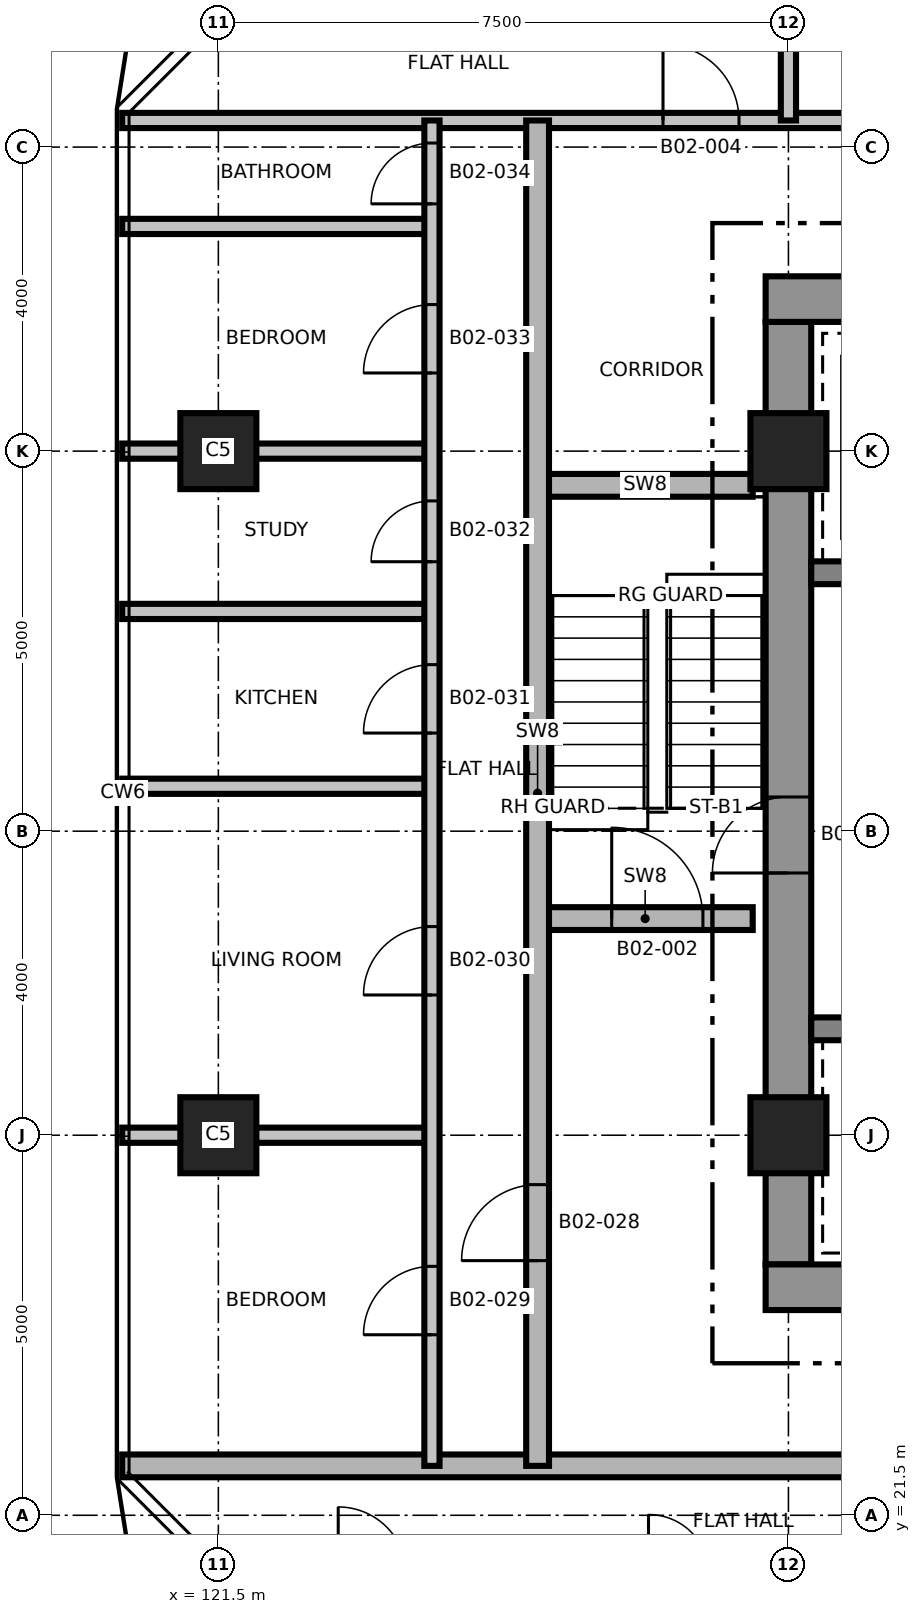
"""IFC4 building model, lengths in metres.
Left out: names, types, materials, properties, quantities, classifications, styles, units other than length and angle.
Written with IfcOpenShell. Run it as: python <this file> out.ifc"""

import sys

from ifc_helpers import new_model, si_unit, direction, frame, frame_2d, origin, origin_2d, place, context, subcontext, project, spatial, rectangle, extrude, element, fill, save


model = new_model("IFC4")
c1 = context("Model", 3, precision=1e-05, world=origin(), true_north=direction((0.0, 1.0)))
c2 = subcontext(c1, "Body", "Model", "MODEL_VIEW")
j1 = project(units=[si_unit("LENGTHUNIT", "METRE"), si_unit("PLANEANGLEUNIT", "RADIAN")], contexts=[c1])
p1 = place(None, origin())
s1 = spatial("IfcSite", under=j1, at=p1, CompositionType="ELEMENT")
p2 = place(p1, origin())
s2 = spatial("IfcBuilding", under=s1, at=p2, CompositionType="ELEMENT")
p3 = place(p2, frame((0.0, 0.0, 44.6)))
s3 = spatial("IfcBuildingStorey", under=s2, at=p3, CompositionType="ELEMENT", Elevation=44.6)
p4 = place(p3, frame((129.0, 24.8, 0.0), z_axis=(0.0, 0.0, 1.0), x_axis=(0.0, 1.0, 0.0)))
e1 = element("IfcWall", 1, at=p4, inside=s3, PredefinedType="SHEAR", context=c2, shape_type="SweptSolid", body=[
    extrude(rectangle(XDim=12.4, YDim=0.6, at=frame_2d((6.2, 0.0))), origin(), (0.0, 0.0, 1.0), 3.7),
])
p5 = place(p4, frame((5.15, 0.0, 0.0)))
e2 = element("IfcOpeningElement", 2, at=p5, cuts=e1, PredefinedType="OPENING", context=c2, shape_type="SweptSolid", body=[
    extrude(rectangle(XDim=1.0, YDim=2.1, at=frame_2d((0.5, 1.05))), frame((0.0, 0.31, 0.0), z_axis=(0.0, -1.0, 0.0), x_axis=(1.0, 0.0, 0.0)), (0.0, 0.0, 1.0), 0.62),
])
p6 = place(p3, frame((128.7, 24.5, 0.0), z_axis=(0.0, 0.0, 1.0), x_axis=(1.0, 0.0, 0.0)))
e3 = element("IfcWall", 3, at=p6, inside=s3, PredefinedType="SHEAR", context=c2, shape_type="SweptSolid", body=[
    extrude(rectangle(XDim=15.0, YDim=0.6, at=frame_2d((7.5, 0.0))), origin(), (0.0, 0.0, 1.0), 3.7),
])
p7 = place(p6, frame((9.65, 0.0, 0.0)))
e4 = element("IfcOpeningElement", 4, at=p7, cuts=e3, PredefinedType="OPENING", context=c2, shape_type="SweptSolid", body=[
    extrude(rectangle(XDim=1.5, YDim=2.1, at=frame_2d((0.75, 1.05))), frame((0.0, 0.31, 0.0), z_axis=(0.0, -1.0, 0.0), x_axis=(1.0, 0.0, 0.0)), (0.0, 0.0, 1.0), 0.62),
])
p8 = place(p6, frame((1.25, 0.0, 0.0)))
e5 = element("IfcOpeningElement", 5, at=p8, cuts=e3, PredefinedType="OPENING", context=c2, shape_type="SweptSolid", body=[
    extrude(rectangle(XDim=0.9, YDim=2.1, at=frame_2d((0.45, 1.05))), frame((0.0, 0.31, 0.0), z_axis=(0.0, -1.0, 0.0), x_axis=(1.0, 0.0, 0.0)), (0.0, 0.0, 1.0), 0.62),
])
p9 = place(p3, frame((128.7, 37.5, 0.0), z_axis=(0.0, 0.0, 1.0), x_axis=(1.0, 0.0, 0.0)))
e6 = element("IfcWall", 6, at=p9, inside=s3, PredefinedType="SHEAR", context=c2, shape_type="SweptSolid", body=[
    extrude(rectangle(XDim=15.0, YDim=0.6, at=frame_2d((7.5, 0.0))), origin(), (0.0, 0.0, 1.0), 3.7),
])
p10 = place(p9, frame((9.65, 0.0, 0.0)))
e7 = element("IfcOpeningElement", 7, at=p10, cuts=e6, PredefinedType="OPENING", context=c2, shape_type="SweptSolid", body=[
    extrude(rectangle(XDim=1.5, YDim=2.1, at=frame_2d((0.75, 1.05))), frame((0.0, 0.31, 0.0), z_axis=(0.0, -1.0, 0.0), x_axis=(1.0, 0.0, 0.0)), (0.0, 0.0, 1.0), 0.62),
])
p11 = place(p9, frame((12.85, 0.0, 0.0)))
e8 = element("IfcOpeningElement", 8, at=p11, cuts=e6, PredefinedType="OPENING", context=c2, shape_type="SweptSolid", body=[
    extrude(rectangle(XDim=0.9, YDim=2.1, at=frame_2d((0.45, 1.05))), frame((0.0, 0.31, 0.0), z_axis=(0.0, -1.0, 0.0), x_axis=(1.0, 0.0, 0.0)), (0.0, 0.0, 1.0), 0.62),
])
p12 = place(p9, frame((5.55, 0.0, 0.0)))
e9 = element("IfcOpeningElement", 9, at=p12, cuts=e6, PredefinedType="OPENING", context=c2, shape_type="SweptSolid", body=[
    extrude(rectangle(XDim=0.9, YDim=2.1, at=frame_2d((0.45, 1.05))), frame((0.0, 0.31, 0.0), z_axis=(0.0, -1.0, 0.0), x_axis=(1.0, 0.0, 0.0)), (0.0, 0.0, 1.0), 0.62),
])
p13 = place(p3, frame((129.3, 27.9, 0.0), z_axis=(0.0, 0.0, 1.0), x_axis=(1.0, 0.0, 0.0)))
e10 = element("IfcWall", 10, at=p13, inside=s3, PredefinedType="SHEAR", context=c2, shape_type="SweptSolid", body=[
    extrude(rectangle(XDim=2.65, YDim=0.3, at=frame_2d((1.325, 0.0))), origin(), (0.0, 0.0, 1.0), 3.7),
])
p14 = place(p3, frame((129.3, 33.9, 0.0), z_axis=(0.0, 0.0, 1.0), x_axis=(1.0, 0.0, 0.0)))
e11 = element("IfcWall", 11, at=p14, inside=s3, PredefinedType="SHEAR", context=c2, shape_type="SweptSolid", body=[
    extrude(rectangle(XDim=2.65, YDim=0.3, at=frame_2d((1.325, 0.0))), origin(), (0.0, 0.0, 1.0), 3.7),
])
p15 = place(p14, frame((1.05, 0.0, 0.0)))
e12 = element("IfcOpeningElement", 12, at=p15, cuts=e11, PredefinedType="OPENING", context=c2, shape_type="SweptSolid", body=[
    extrude(rectangle(XDim=1.3, YDim=2.4, at=frame_2d((0.65, 1.2))), frame((0.0, 0.16, 0.0), z_axis=(0.0, -1.0, 0.0), x_axis=(1.0, 0.0, 0.0)), (0.0, 0.0, 1.0), 0.32),
])
for number, where, z_axis, x_axis in (
    (13, (121.5, 26.5, 0.0), (0.0, 0.0, 1.0), (1.0, 0.0, 0.0)),
    (14, (129.0, 26.5, 0.0), (0.0, 0.0, 1.0), (1.0, 0.0, 0.0)),
    (15, (121.5, 35.5, 0.0), (0.0, 0.0, 1.0), (1.0, 0.0, 0.0)),
    (16, (129.0, 35.5, 0.0), (0.0, 0.0, 1.0), (1.0, 0.0, 0.0)),
):
    element("IfcColumn", number, at=place(p3, frame(where, z_axis=z_axis, x_axis=x_axis)), inside=s3, PredefinedType="COLUMN", context=c2, shape_type="SweptSolid", body=[
        extrude(rectangle(XDim=1.0, YDim=1.0, at=origin_2d()), origin(), (0.0, 0.0, 1.0), 3.7),
    ])
p16 = place(p3, frame((120.235, 22.15, 0.0), z_axis=(0.0, 0.0, 1.0), x_axis=(1.0, 0.0, 0.0)))
e17 = element("IfcWall", 17, at=p16, inside=s3, PredefinedType="SHEAR", context=c2, shape_type="SweptSolid", body=[
    extrude(rectangle(XDim=32.53, YDim=0.3, at=frame_2d((16.265, 0.0))), origin(), (0.0, 0.0, 1.0), 3.4),
])
p17 = place(p16, frame((22.515, 0.0, 0.0)))
e18 = element("IfcOpeningElement", 18, at=p17, cuts=e17, PredefinedType="OPENING", context=c2, shape_type="SweptSolid", body=[
    extrude(rectangle(XDim=1.0, YDim=2.1, at=frame_2d((0.5, 1.05))), frame((0.0, 0.16, 0.0), z_axis=(0.0, -1.0, 0.0), x_axis=(1.0, 0.0, 0.0)), (0.0, 0.0, 1.0), 0.32),
])
p18 = place(p16, frame((10.865, 0.0, 0.0)))
e19 = element("IfcOpeningElement", 19, at=p18, cuts=e17, PredefinedType="OPENING", context=c2, shape_type="SweptSolid", body=[
    extrude(rectangle(XDim=1.0, YDim=2.1, at=frame_2d((0.5, 1.05))), frame((0.0, 0.16, 0.0), z_axis=(0.0, -1.0, 0.0), x_axis=(1.0, 0.0, 0.0)), (0.0, 0.0, 1.0), 0.32),
])
p19 = place(p16, frame((24.415, 0.0, 0.0)))
e20 = element("IfcOpeningElement", 20, at=p19, cuts=e17, PredefinedType="OPENING", context=c2, shape_type="SweptSolid", body=[
    extrude(rectangle(XDim=1.0, YDim=2.1, at=frame_2d((0.5, 1.05))), frame((0.0, 0.16, 0.0), z_axis=(0.0, -1.0, 0.0), x_axis=(1.0, 0.0, 0.0)), (0.0, 0.0, 1.0), 0.32),
])
p20 = place(p16, frame((16.515, 0.0, 0.0)))
e21 = element("IfcOpeningElement", 21, at=p20, cuts=e17, PredefinedType="OPENING", context=c2, shape_type="SweptSolid", body=[
    extrude(rectangle(XDim=0.9, YDim=2.1, at=frame_2d((0.45, 1.05))), frame((0.0, 0.16, 0.0), z_axis=(0.0, -1.0, 0.0), x_axis=(1.0, 0.0, 0.0)), (0.0, 0.0, 1.0), 0.32),
])
p21 = place(p3, frame((120.235, 26.5, 0.0), z_axis=(0.0, 0.0, 1.0), x_axis=(1.0, 0.0, 0.0)))
e22 = element("IfcWall", 22, at=p21, inside=s3, PredefinedType="PARTITIONING", context=c2, shape_type="SweptSolid", body=[
    extrude(rectangle(XDim=4.075, YDim=0.2, at=frame_2d((2.038, 0.0))), origin(), (0.0, 0.0, 1.0), 3.4),
])
p22 = place(p3, frame((125.7, 29.35, 0.0), z_axis=(0.0, 0.0, 1.0), x_axis=(1.0, 0.0, 0.0)))
e23 = element("IfcWall", 23, at=p22, inside=s3, PredefinedType="SHEAR", context=c2, shape_type="SweptSolid", body=[
    extrude(rectangle(XDim=2.83, YDim=0.3, at=frame_2d((1.415, 0.0))), origin(), (0.0, 0.0, 1.0), 3.4),
])
p23 = place(p22, frame((0.975, 0.0, 0.0)))
e24 = element("IfcOpeningElement", 24, at=p23, cuts=e23, PredefinedType="OPENING", context=c2, shape_type="SweptSolid", body=[
    extrude(rectangle(XDim=1.2, YDim=2.1, at=frame_2d((0.6, 1.05))), frame((0.0, 0.16, 0.0), z_axis=(0.0, -1.0, 0.0), x_axis=(1.0, 0.0, 0.0)), (0.0, 0.0, 1.0), 0.32),
])
for number, where, z_axis, x_axis in (
    (25, (120.235, 31.091, 0.0), (0.0, 0.0, 1.0), (1.0, 0.0, 0.0)),
    (26, (120.235, 33.391, 0.0), (0.0, 0.0, 1.0), (1.0, 0.0, 0.0)),
):
    element("IfcWall", number, at=place(p3, frame(where, z_axis=z_axis, x_axis=x_axis)), inside=s3, PredefinedType="PARTITIONING", context=c2, shape_type="SweptSolid", body=[
        extrude(rectangle(XDim=4.075, YDim=0.2, at=frame_2d((2.038, 0.0))), origin(), (0.0, 0.0, 1.0), 3.4),
    ])
p24 = place(p3, frame((125.7, 35.05, 0.0), z_axis=(0.0, 0.0, 1.0), x_axis=(1.0, 0.0, 0.0)))
e27 = element("IfcWall", 27, at=p24, inside=s3, PredefinedType="SHEAR", context=c2, shape_type="SweptSolid", body=[
    extrude(rectangle(XDim=2.83, YDim=0.3, at=frame_2d((1.415, 0.0))), origin(), (0.0, 0.0, 1.0), 3.4),
])
for number, where, z_axis, x_axis in (
    (28, (120.235, 35.5, 0.0), (0.0, 0.0, 1.0), (1.0, 0.0, 0.0)),
    (29, (120.235, 38.456, 0.0), (0.0, 0.0, 1.0), (1.0, 0.0, 0.0)),
):
    element("IfcWall", number, at=place(p3, frame(where, z_axis=z_axis, x_axis=x_axis)), inside=s3, PredefinedType="PARTITIONING", context=c2, shape_type="SweptSolid", body=[
        extrude(rectangle(XDim=4.075, YDim=0.2, at=frame_2d((2.038, 0.0))), origin(), (0.0, 0.0, 1.0), 3.4),
    ])
p25 = place(p3, frame((120.235, 39.85, 0.0), z_axis=(0.0, 0.0, 1.0), x_axis=(1.0, 0.0, 0.0)))
e30 = element("IfcWall", 30, at=p25, inside=s3, PredefinedType="PARTITIONING", context=c2, shape_type="SweptSolid", body=[
    extrude(rectangle(XDim=32.53, YDim=0.2, at=frame_2d((16.265, 0.0))), origin(), (0.0, 0.0, 1.0), 3.4),
])
p26 = place(p25, frame((7.115, 0.0, 0.0)))
e31 = element("IfcOpeningElement", 31, at=p26, cuts=e30, PredefinedType="OPENING", context=c2, shape_type="SweptSolid", body=[
    extrude(rectangle(XDim=1.0, YDim=2.1, at=frame_2d((0.5, 1.05))), frame((0.0, 0.11, 0.0), z_axis=(0.0, -1.0, 0.0), x_axis=(1.0, 0.0, 0.0)), (0.0, 0.0, 1.0), 0.22),
])
p27 = place(p25, frame((15.765, 0.0, 0.0)))
e32 = element("IfcOpeningElement", 32, at=p27, cuts=e30, PredefinedType="OPENING", context=c2, shape_type="SweptSolid", body=[
    extrude(rectangle(XDim=1.0, YDim=2.1, at=frame_2d((0.5, 1.05))), frame((0.0, 0.11, 0.0), z_axis=(0.0, -1.0, 0.0), x_axis=(1.0, 0.0, 0.0)), (0.0, 0.0, 1.0), 0.22),
])
p28 = place(p25, frame((24.415, 0.0, 0.0)))
e33 = element("IfcOpeningElement", 33, at=p28, cuts=e30, PredefinedType="OPENING", context=c2, shape_type="SweptSolid", body=[
    extrude(rectangle(XDim=1.0, YDim=2.1, at=frame_2d((0.5, 1.05))), frame((0.0, 0.11, 0.0), z_axis=(0.0, -1.0, 0.0), x_axis=(1.0, 0.0, 0.0)), (0.0, 0.0, 1.0), 0.22),
])
p29 = place(p3, frame((124.31, 22.15, 0.0), z_axis=(0.0, 0.0, 1.0), x_axis=(0.0, 1.0, 0.0)))
e34 = element("IfcWall", 34, at=p29, inside=s3, PredefinedType="PARTITIONING", context=c2, shape_type="SweptSolid", body=[
    extrude(rectangle(XDim=17.7, YDim=0.2, at=frame_2d((8.85, 0.0))), origin(), (0.0, 0.0, 1.0), 3.4),
])
p30 = place(p29, frame((1.725, 0.0, 0.0)))
e35 = element("IfcOpeningElement", 35, at=p30, cuts=e34, PredefinedType="OPENING", context=c2, shape_type="SweptSolid", body=[
    extrude(rectangle(XDim=0.9, YDim=2.1, at=frame_2d((0.45, 1.05))), frame((0.0, 0.11, 0.0), z_axis=(0.0, -1.0, 0.0), x_axis=(1.0, 0.0, 0.0)), (0.0, 0.0, 1.0), 0.22),
])
p31 = place(p29, frame((6.195, 0.0, 0.0)))
e36 = element("IfcOpeningElement", 36, at=p31, cuts=e34, PredefinedType="OPENING", context=c2, shape_type="SweptSolid", body=[
    extrude(rectangle(XDim=0.9, YDim=2.1, at=frame_2d((0.45, 1.05))), frame((0.0, 0.11, 0.0), z_axis=(0.0, -1.0, 0.0), x_axis=(1.0, 0.0, 0.0)), (0.0, 0.0, 1.0), 0.22),
])
p32 = place(p29, frame((9.641, 0.0, 0.0)))
e37 = element("IfcOpeningElement", 37, at=p32, cuts=e34, PredefinedType="OPENING", context=c2, shape_type="SweptSolid", body=[
    extrude(rectangle(XDim=0.9, YDim=2.1, at=frame_2d((0.45, 1.05))), frame((0.0, 0.11, 0.0), z_axis=(0.0, -1.0, 0.0), x_axis=(1.0, 0.0, 0.0)), (0.0, 0.0, 1.0), 0.22),
])
p33 = place(p29, frame((11.895, 0.0, 0.0)))
e38 = element("IfcOpeningElement", 38, at=p33, cuts=e34, PredefinedType="OPENING", context=c2, shape_type="SweptSolid", body=[
    extrude(rectangle(XDim=0.8, YDim=2.1, at=frame_2d((0.4, 1.05))), frame((0.0, 0.11, 0.0), z_axis=(0.0, -1.0, 0.0), x_axis=(1.0, 0.0, 0.0)), (0.0, 0.0, 1.0), 0.22),
])
p34 = place(p29, frame((14.378, 0.0, 0.0)))
e39 = element("IfcOpeningElement", 39, at=p34, cuts=e34, PredefinedType="OPENING", context=c2, shape_type="SweptSolid", body=[
    extrude(rectangle(XDim=0.9, YDim=2.1, at=frame_2d((0.45, 1.05))), frame((0.0, 0.11, 0.0), z_axis=(0.0, -1.0, 0.0), x_axis=(1.0, 0.0, 0.0)), (0.0, 0.0, 1.0), 0.22),
])
p35 = place(p29, frame((16.603, 0.0, 0.0)))
e40 = element("IfcOpeningElement", 40, at=p35, cuts=e34, PredefinedType="OPENING", context=c2, shape_type="SweptSolid", body=[
    extrude(rectangle(XDim=0.8, YDim=2.1, at=frame_2d((0.4, 1.05))), frame((0.0, 0.11, 0.0), z_axis=(0.0, -1.0, 0.0), x_axis=(1.0, 0.0, 0.0)), (0.0, 0.0, 1.0), 0.22),
])
p36 = place(p3, frame((125.7, 22.15, 0.0), z_axis=(0.0, 0.0, 1.0), x_axis=(0.0, 1.0, 0.0)))
e41 = element("IfcWall", 41, at=p36, inside=s3, PredefinedType="SHEAR", context=c2, shape_type="SweptSolid", body=[
    extrude(rectangle(XDim=17.7, YDim=0.3, at=frame_2d((8.85, 0.0))), origin(), (0.0, 0.0, 1.0), 3.4),
])
p37 = place(p36, frame((2.7, 0.0, 0.0)))
e42 = element("IfcOpeningElement", 42, at=p37, cuts=e41, PredefinedType="OPENING", context=c2, shape_type="SweptSolid", body=[
    extrude(rectangle(XDim=1.0, YDim=2.1, at=frame_2d((0.5, 1.05))), frame((0.0, 0.16, 0.0), z_axis=(0.0, -1.0, 0.0), x_axis=(1.0, 0.0, 0.0)), (0.0, 0.0, 1.0), 0.32),
])
p38 = place(p3, frame((129.0, 39.85, 0.0), z_axis=(0.0, 0.0, 1.0), x_axis=(0.0, 1.0, 0.0)))
e43 = element("IfcWall", 43, at=p38, inside=s3, PredefinedType="PARTITIONING", context=c2, shape_type="SweptSolid", body=[
    extrude(rectangle(XDim=5.915, YDim=0.2, at=frame_2d((2.958, 0.0))), origin(), (0.0, 0.0, 1.0), 3.4),
])
p39 = place(p23, origin())
e44 = element("IfcDoor", 44, at=p39, inside=s3, OperationType="SINGLE_SWING_RIGHT", PredefinedType="DOOR", context=c2, shape_type="SweptSolid", body=[
    extrude(rectangle(XDim=1.2, YDim=2.1, at=frame_2d((0.6, 1.05))), frame((0.0, 0.025, 0.0), z_axis=(0.0, -1.0, 0.0), x_axis=(1.0, 0.0, 0.0)), (0.0, 0.0, 1.0), 0.05),
])
fill(e24, e44)
p40 = place(p26, origin())
e45 = element("IfcDoor", 45, at=p40, inside=s3, OperationType="SINGLE_SWING_RIGHT", PredefinedType="DOOR", context=c2, shape_type="SweptSolid", body=[
    extrude(rectangle(XDim=1.0, YDim=2.1, at=frame_2d((0.5, 1.05))), frame((0.0, 0.025, 0.0), z_axis=(0.0, -1.0, 0.0), x_axis=(1.0, 0.0, 0.0)), (0.0, 0.0, 1.0), 0.05),
])
fill(e31, e45)
p41 = place(p37, origin())
e46 = element("IfcDoor", 46, at=p41, inside=s3, OperationType="SINGLE_SWING_RIGHT", PredefinedType="DOOR", context=c2, shape_type="SweptSolid", body=[
    extrude(rectangle(XDim=1.0, YDim=2.1, at=frame_2d((0.5, 1.05))), frame((0.0, 0.025, 0.0), z_axis=(0.0, -1.0, 0.0), x_axis=(1.0, 0.0, 0.0)), (0.0, 0.0, 1.0), 0.05),
])
fill(e42, e46)
p42 = place(p30, origin())
e47 = element("IfcDoor", 47, at=p42, inside=s3, OperationType="SINGLE_SWING_LEFT", PredefinedType="DOOR", context=c2, shape_type="SweptSolid", body=[
    extrude(rectangle(XDim=0.9, YDim=2.1, at=frame_2d((0.45, 1.05))), frame((0.0, 0.025, 0.0), z_axis=(0.0, -1.0, 0.0), x_axis=(1.0, 0.0, 0.0)), (0.0, 0.0, 1.0), 0.05),
])
fill(e35, e47)
p43 = place(p31, origin())
e48 = element("IfcDoor", 48, at=p43, inside=s3, OperationType="SINGLE_SWING_RIGHT", PredefinedType="DOOR", context=c2, shape_type="SweptSolid", body=[
    extrude(rectangle(XDim=0.9, YDim=2.1, at=frame_2d((0.45, 1.05))), frame((0.0, 0.025, 0.0), z_axis=(0.0, -1.0, 0.0), x_axis=(1.0, 0.0, 0.0)), (0.0, 0.0, 1.0), 0.05),
])
fill(e36, e48)
p44 = place(p32, origin())
e49 = element("IfcDoor", 49, at=p44, inside=s3, OperationType="SINGLE_SWING_LEFT", PredefinedType="DOOR", context=c2, shape_type="SweptSolid", body=[
    extrude(rectangle(XDim=0.9, YDim=2.1, at=frame_2d((0.45, 1.05))), frame((0.0, 0.025, 0.0), z_axis=(0.0, -1.0, 0.0), x_axis=(1.0, 0.0, 0.0)), (0.0, 0.0, 1.0), 0.05),
])
fill(e37, e49)
p45 = place(p33, origin())
e50 = element("IfcDoor", 50, at=p45, inside=s3, OperationType="SINGLE_SWING_RIGHT", PredefinedType="DOOR", context=c2, shape_type="SweptSolid", body=[
    extrude(rectangle(XDim=0.8, YDim=2.1, at=frame_2d((0.4, 1.05))), frame((0.0, 0.025, 0.0), z_axis=(0.0, -1.0, 0.0), x_axis=(1.0, 0.0, 0.0)), (0.0, 0.0, 1.0), 0.05),
])
fill(e38, e50)
p46 = place(p34, origin())
e51 = element("IfcDoor", 51, at=p46, inside=s3, OperationType="SINGLE_SWING_LEFT", PredefinedType="DOOR", context=c2, shape_type="SweptSolid", body=[
    extrude(rectangle(XDim=0.9, YDim=2.1, at=frame_2d((0.45, 1.05))), frame((0.0, 0.025, 0.0), z_axis=(0.0, -1.0, 0.0), x_axis=(1.0, 0.0, 0.0)), (0.0, 0.0, 1.0), 0.05),
])
fill(e39, e51)
p47 = place(p35, origin())
e52 = element("IfcDoor", 52, at=p47, inside=s3, OperationType="SINGLE_SWING_RIGHT", PredefinedType="DOOR", context=c2, shape_type="SweptSolid", body=[
    extrude(rectangle(XDim=0.8, YDim=2.1, at=frame_2d((0.4, 1.05))), frame((0.0, 0.025, 0.0), z_axis=(0.0, -1.0, 0.0), x_axis=(1.0, 0.0, 0.0)), (0.0, 0.0, 1.0), 0.05),
])
fill(e40, e52)
p48 = place(p5, origin())
e53 = element("IfcDoor", 53, at=p48, inside=s3, OperationType="SINGLE_SWING_RIGHT", PredefinedType="DOOR", context=c2, shape_type="SweptSolid", body=[
    extrude(rectangle(XDim=1.0, YDim=2.1, at=frame_2d((0.5, 1.05))), frame((0.0, 0.025, 0.0), z_axis=(0.0, -1.0, 0.0), x_axis=(1.0, 0.0, 0.0)), (0.0, 0.0, 1.0), 0.05),
])
fill(e2, e53)
save(model, sys.argv[1])
